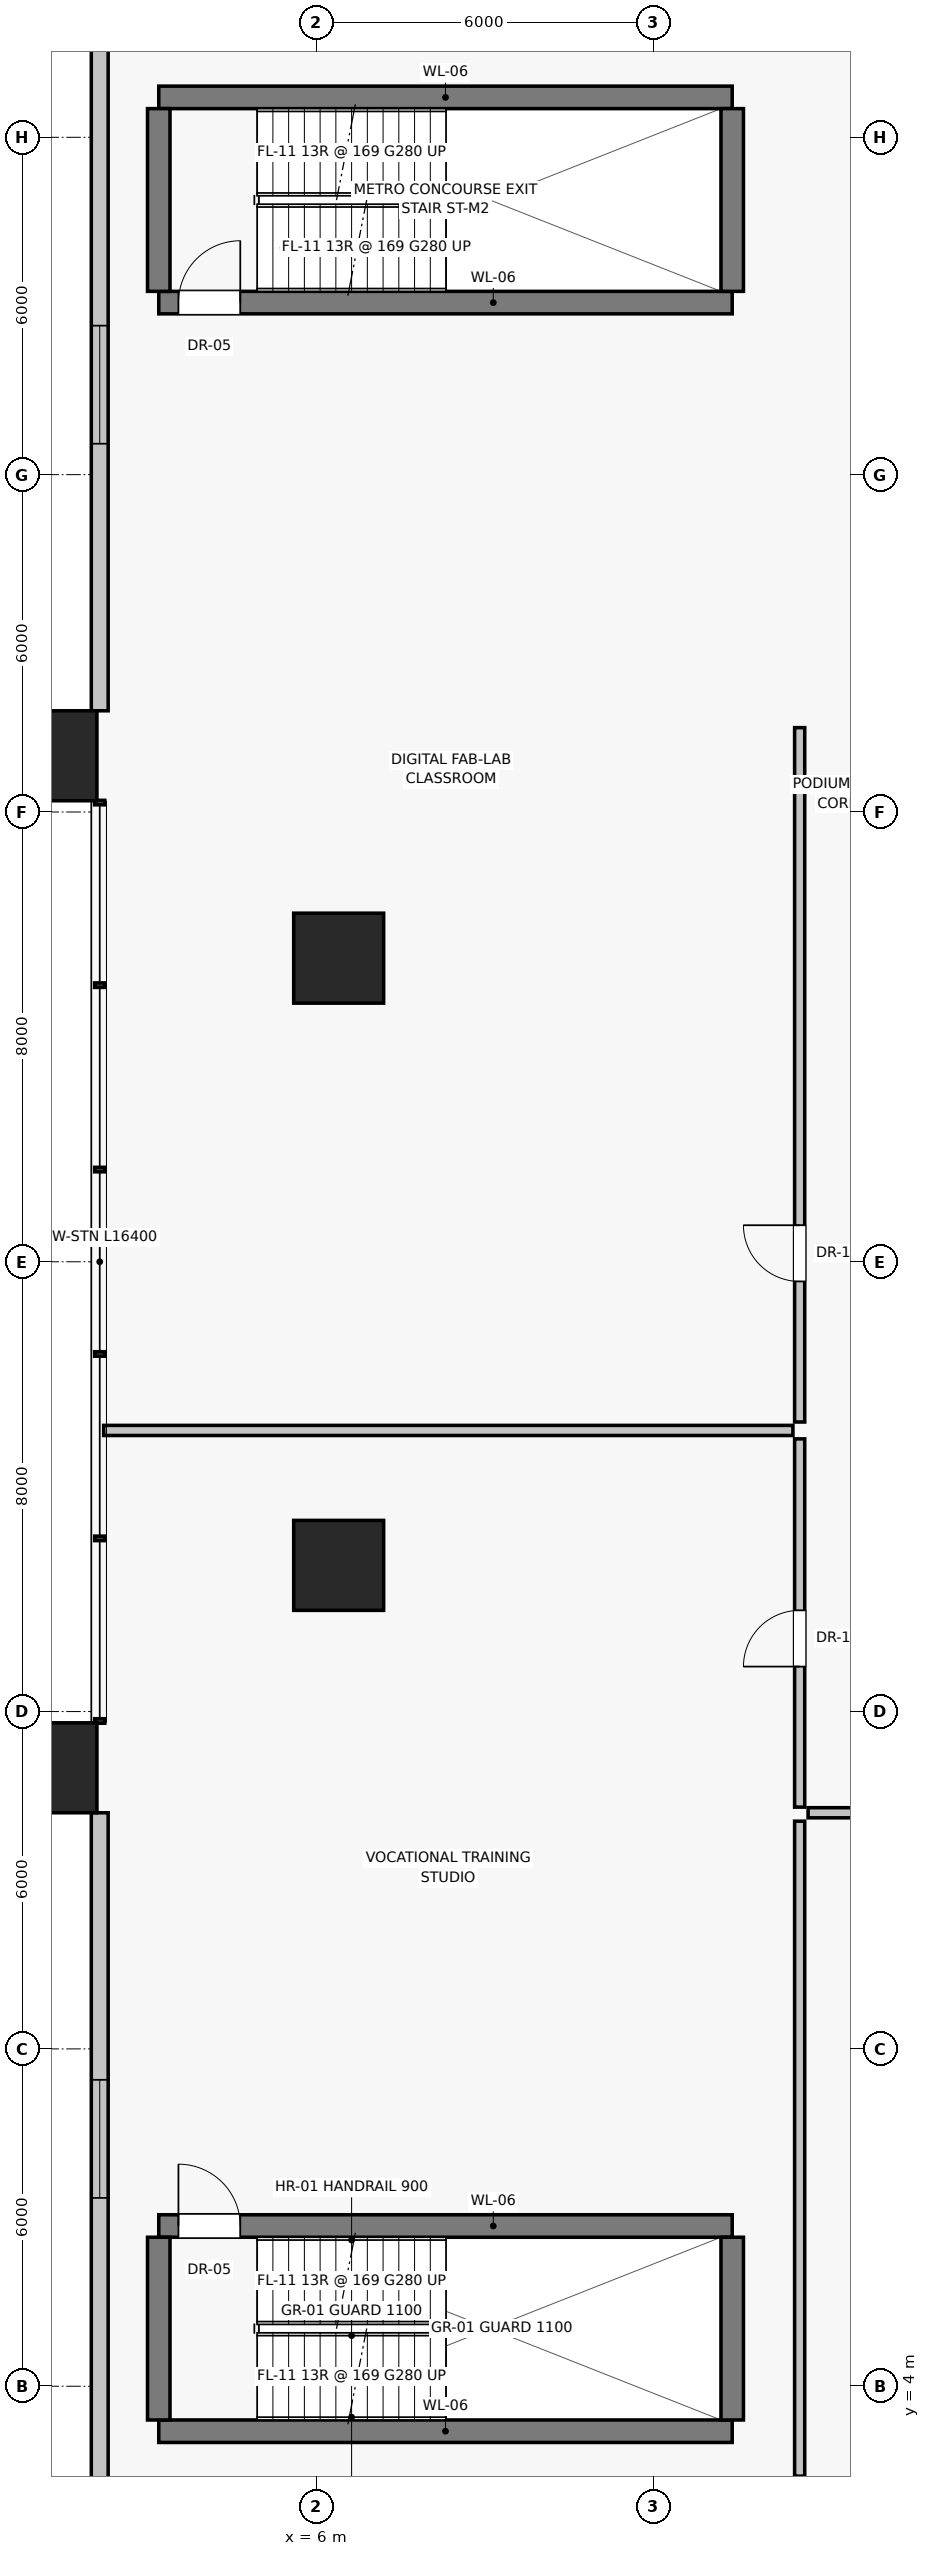
"""IFC4 building model, lengths in metres.
Left out: names, types, materials, properties, quantities, classifications, styles, units other than length and angle.
Written with IfcOpenShell. Run it as: python <this file> out.ifc"""

import sys

from ifc_helpers import new_model, si_unit, direction, frame, frame_2d, origin, origin_2d, place, context, subcontext, project, spatial, rectangle, extrude, source, transform, mapped, element, fill, save


model = new_model("IFC4")
c1 = context("Model", 3, precision=1e-05, world=origin(), true_north=direction((0.0, 1.0)))
c2 = subcontext(c1, "Body", "Model", "MODEL_VIEW")
j1 = project(units=[si_unit("LENGTHUNIT", "METRE"), si_unit("PLANEANGLEUNIT", "RADIAN")], contexts=[c1])
p1 = place(None, origin())
s1 = spatial("IfcSite", under=j1, at=p1, CompositionType="ELEMENT")
p2 = place(p1, origin())
s2 = spatial("IfcBuilding", under=s1, at=p2, CompositionType="ELEMENT")
p3 = place(p2, frame((0.0, 0.0, 9.6)))
s3 = spatial("IfcBuildingStorey", under=s2, at=p3, CompositionType="ELEMENT", Elevation=9.6)
for number, where, z_axis, x_axis in (
    (1, (1.3, 15.0, 0.0), (0.0, 0.0, 1.0), (1.0, 0.0, 0.0)),
    (2, (1.3, 33.0, 0.0), (0.0, 0.0, 1.0), (1.0, 0.0, 0.0)),
    (3, (6.4, 29.4, 0.0), (0.0, 0.0, 1.0), (1.0, 0.0, 0.0)),
    (4, (6.4, 18.6, 0.0), (0.0, 0.0, 1.0), (1.0, 0.0, 0.0)),
):
    element("IfcColumn", number, at=place(p3, frame(where, z_axis=z_axis, x_axis=x_axis)), inside=s3, PredefinedType="COLUMN", context=c2, shape_type="SweptSolid", body=[
        extrude(rectangle(XDim=1.6, YDim=1.6, at=origin_2d()), origin(), (0.0, 0.0, 1.0), 4.4),
    ])
p4 = place(p3, frame((2.15, 45.7, 0.0), z_axis=(0.0, 0.0, 1.0), x_axis=(0.0, -1.0, 0.0)))
e5 = element("IfcWall", 5, at=p4, inside=s3, PredefinedType="SOLIDWALL", context=c2, shape_type="SweptSolid", body=[
    extrude(rectangle(XDim=11.9, YDim=0.3, at=frame_2d((5.95, 0.0))), origin(), (0.0, 0.0, 1.0), 3.0),
])
p5 = place(p4, frame((5.05, 0.0, 0.85)))
e6 = element("IfcOpeningElement", 6, at=p5, cuts=e5, PredefinedType="OPENING", context=c2, shape_type="SweptSolid", body=[
    extrude(rectangle(XDim=2.1, YDim=1.75, at=frame_2d((1.05, 0.875))), frame((0.0, 0.16, 0.0), z_axis=(0.0, -1.0, 0.0), x_axis=(1.0, 0.0, 0.0)), (0.0, 0.0, 1.0), 0.32),
])
p6 = place(p3, frame((2.15, 14.2, 0.0), z_axis=(0.0, 0.0, 1.0), x_axis=(0.0, -1.0, 0.0)))
e7 = element("IfcWall", 7, at=p6, inside=s3, PredefinedType="SOLIDWALL", context=c2, shape_type="SweptSolid", body=[
    extrude(rectangle(XDim=11.9, YDim=0.3, at=frame_2d((5.95, 0.0))), origin(), (0.0, 0.0, 1.0), 3.0),
])
p7 = place(p6, frame((4.75, 0.0, 0.85)))
e8 = element("IfcOpeningElement", 8, at=p7, cuts=e7, PredefinedType="OPENING", context=c2, shape_type="SweptSolid", body=[
    extrude(rectangle(XDim=2.1, YDim=1.75, at=frame_2d((1.05, 0.875))), frame((0.0, 0.16, 0.0), z_axis=(0.0, -1.0, 0.0), x_axis=(1.0, 0.0, 0.0)), (0.0, 0.0, 1.0), 0.32),
])
p8 = place(p3, frame((3.2, 3.2, 0.0), z_axis=(0.0, 0.0, 1.0), x_axis=(1.0, 0.0, 0.0)))
e9 = element("IfcWall", 9, at=p8, inside=s3, PredefinedType="SHEAR", context=c2, shape_type="SweptSolid", body=[
    extrude(rectangle(XDim=10.2, YDim=0.4, at=frame_2d((5.1, 0.0))), origin(), (0.0, 0.0, 1.0), 4.1),
])
p9 = place(p3, frame((3.2, 6.85, 0.0), z_axis=(0.0, 0.0, 1.0), x_axis=(1.0, 0.0, 0.0)))
e10 = element("IfcWall", 10, at=p9, inside=s3, PredefinedType="SHEAR", context=c2, shape_type="SweptSolid", body=[
    extrude(rectangle(XDim=10.2, YDim=0.4, at=frame_2d((5.1, 0.0))), origin(), (0.0, 0.0, 1.0), 4.1),
])
p10 = place(p9, frame((0.35, 0.0, 0.0)))
e11 = element("IfcOpeningElement", 11, at=p10, cuts=e10, PredefinedType="OPENING", context=c2, shape_type="SweptSolid", body=[
    extrude(rectangle(XDim=1.1, YDim=2.03, at=frame_2d((0.55, 1.015))), frame((0.0, 0.21, 0.0), z_axis=(0.0, -1.0, 0.0), x_axis=(1.0, 0.0, 0.0)), (0.0, 0.0, 1.0), 0.42),
])
for number, where, z_axis, x_axis in (
    (12, (3.2, 3.4, 0.0), (0.0, 0.0, 1.0), (0.0, 1.0, 0.0)),
    (13, (13.4, 3.4, 0.0), (0.0, 0.0, 1.0), (0.0, 1.0, 0.0)),
):
    element("IfcWall", number, at=place(p3, frame(where, z_axis=z_axis, x_axis=x_axis)), inside=s3, PredefinedType="SHEAR", context=c2, shape_type="SweptSolid", body=[
        extrude(rectangle(XDim=3.25, YDim=0.4, at=frame_2d((1.625, 0.0))), origin(), (0.0, 0.0, 1.0), 4.1),
    ])
p11 = place(p3, frame((3.2, 41.06, 0.0), z_axis=(0.0, 0.0, 1.0), x_axis=(1.0, 0.0, 0.0)))
e14 = element("IfcWall", 14, at=p11, inside=s3, PredefinedType="SHEAR", context=c2, shape_type="SweptSolid", body=[
    extrude(rectangle(XDim=10.2, YDim=0.4, at=frame_2d((5.1, 0.0))), origin(), (0.0, 0.0, 1.0), 4.1),
])
p12 = place(p11, frame((0.35, 0.0, 0.0)))
e15 = element("IfcOpeningElement", 15, at=p12, cuts=e14, PredefinedType="OPENING", context=c2, shape_type="SweptSolid", body=[
    extrude(rectangle(XDim=1.1, YDim=2.03, at=frame_2d((0.55, 1.015))), frame((0.0, 0.21, 0.0), z_axis=(0.0, -1.0, 0.0), x_axis=(1.0, 0.0, 0.0)), (0.0, 0.0, 1.0), 0.42),
])
p13 = place(p3, frame((3.2, 44.71, 0.0), z_axis=(0.0, 0.0, 1.0), x_axis=(1.0, 0.0, 0.0)))
e16 = element("IfcWall", 16, at=p13, inside=s3, PredefinedType="SHEAR", context=c2, shape_type="SweptSolid", body=[
    extrude(rectangle(XDim=10.2, YDim=0.4, at=frame_2d((5.1, 0.0))), origin(), (0.0, 0.0, 1.0), 4.1),
])
for number, where, z_axis, x_axis in (
    (17, (3.2, 41.26, 0.0), (0.0, 0.0, 1.0), (0.0, 1.0, 0.0)),
    (18, (13.4, 41.26, 0.0), (0.0, 0.0, 1.0), (0.0, 1.0, 0.0)),
):
    element("IfcWall", number, at=place(p3, frame(where, z_axis=z_axis, x_axis=x_axis)), inside=s3, PredefinedType="SHEAR", context=c2, shape_type="SweptSolid", body=[
        extrude(rectangle(XDim=3.25, YDim=0.4, at=frame_2d((1.625, 0.0))), origin(), (0.0, 0.0, 1.0), 4.1),
    ])
p14 = place(p3, frame((14.6, 14.3, 0.0), z_axis=(0.0, 0.0, 1.0), x_axis=(0.0, 1.0, 0.0)))
e19 = element("IfcWall", 19, at=p14, inside=s3, PredefinedType="PARTITIONING", context=c2, shape_type="SweptSolid", body=[
    extrude(rectangle(XDim=6.55, YDim=0.18, at=frame_2d((3.275, 0.0))), origin(), (0.0, 0.0, 1.0), 4.1),
])
p15 = place(p14, frame((2.5, 0.0, 0.0)))
e20 = element("IfcOpeningElement", 20, at=p15, cuts=e19, PredefinedType="OPENING", context=c2, shape_type="SweptSolid", body=[
    extrude(rectangle(XDim=1.0, YDim=2.01, at=frame_2d((0.5, 1.005))), frame((0.0, 0.1, 0.0), z_axis=(0.0, -1.0, 0.0), x_axis=(1.0, 0.0, 0.0)), (0.0, 0.0, 1.0), 0.2),
])
p16 = place(p3, frame((14.6, 21.15, 0.0), z_axis=(0.0, 0.0, 1.0), x_axis=(0.0, 1.0, 0.0)))
e21 = element("IfcWall", 21, at=p16, inside=s3, PredefinedType="PARTITIONING", context=c2, shape_type="SweptSolid", body=[
    extrude(rectangle(XDim=12.35, YDim=0.18, at=frame_2d((6.175, 0.0))), origin(), (0.0, 0.0, 1.0), 4.1),
])
p17 = place(p16, frame((2.5, 0.0, 0.0)))
e22 = element("IfcOpeningElement", 22, at=p17, cuts=e21, PredefinedType="OPENING", context=c2, shape_type="SweptSolid", body=[
    extrude(rectangle(XDim=1.0, YDim=2.01, at=frame_2d((0.5, 1.005))), frame((0.0, 0.1, 0.0), z_axis=(0.0, -1.0, 0.0), x_axis=(1.0, 0.0, 0.0)), (0.0, 0.0, 1.0), 0.2),
])
p18 = place(p3, frame((2.22, 21.0, 0.0), z_axis=(0.0, 0.0, 1.0), x_axis=(1.0, 0.0, 0.0)))
e23 = element("IfcWall", 23, at=p18, inside=s3, PredefinedType="PARTITIONING", context=c2, shape_type="SweptSolid", body=[
    extrude(rectangle(XDim=12.26, YDim=0.18, at=frame_2d((6.13, 0.0))), origin(), (0.0, 0.0, 1.0), 4.1),
])
p19 = place(p3, frame((14.6, 2.4, 0.0), z_axis=(0.0, 0.0, 1.0), x_axis=(0.0, 1.0, 0.0)))
e24 = element("IfcWall", 24, at=p19, inside=s3, PredefinedType="PARTITIONING", context=c2, shape_type="SweptSolid", body=[
    extrude(rectangle(XDim=11.65, YDim=0.18, at=frame_2d((5.825, 0.0))), origin(), (0.0, 0.0, 1.0), 4.1),
])
p20 = place(p3, frame((14.75, 14.2, 0.0), z_axis=(0.0, 0.0, 1.0), x_axis=(1.0, 0.0, 0.0)))
e25 = element("IfcWall", 25, at=p20, inside=s3, PredefinedType="PARTITIONING", context=c2, shape_type="SweptSolid", body=[
    extrude(rectangle(XDim=13.1, YDim=0.18, at=frame_2d((6.55, 0.0))), origin(), (0.0, 0.0, 1.0), 4.1),
])
p21 = place(p20, frame((2.5, 0.0, 0.0)))
e26 = element("IfcOpeningElement", 26, at=p21, cuts=e25, PredefinedType="OPENING", context=c2, shape_type="SweptSolid", body=[
    extrude(rectangle(XDim=1.0, YDim=2.01, at=frame_2d((0.5, 1.005))), frame((0.0, 0.1, 0.0), z_axis=(0.0, -1.0, 0.0), x_axis=(1.0, 0.0, 0.0)), (0.0, 0.0, 1.0), 0.2),
])
m1 = source(origin(), c2, "Body", "SweptSolid", [
    extrude(rectangle(XDim=2.1, YDim=1.75, at=frame_2d((1.05, 0.875))), frame((0.0, 0.03, 0.0), z_axis=(0.0, -1.0, 0.0), x_axis=(1.0, 0.0, 0.0)), (0.0, 0.0, 1.0), 0.06),
])
p22 = place(p5, origin())
e27 = element("IfcWindow", 27, at=p22, inside=s3, PartitioningType="DOUBLE_PANEL_VERTICAL", PredefinedType="WINDOW", context=c2, shape_type="MappedRepresentation", body=[
    mapped(m1, transform((0.0, 0.0, 0.0), scale=1.0)),
])
fill(e6, e27)
p23 = place(p7, origin())
e28 = element("IfcWindow", 28, at=p23, inside=s3, PartitioningType="DOUBLE_PANEL_VERTICAL", PredefinedType="WINDOW", context=c2, shape_type="MappedRepresentation", body=[
    mapped(m1, transform((0.0, 0.0, 0.0), scale=1.0)),
])
fill(e8, e28)
m2 = source(origin(), c2, "Body", "SweptSolid", [
    extrude(rectangle(XDim=1.1, YDim=2.03, at=frame_2d((0.55, 1.015))), frame((0.0, 0.025, 0.0), z_axis=(0.0, -1.0, 0.0), x_axis=(1.0, 0.0, 0.0)), (0.0, 0.0, 1.0), 0.05),
])
p24 = place(p10, origin())
e29 = element("IfcDoor", 29, at=p24, inside=s3, OperationType="SINGLE_SWING_LEFT", PredefinedType="DOOR", context=c2, shape_type="MappedRepresentation", body=[
    mapped(m2, transform((0.0, 0.0, 0.0), scale=1.0)),
])
fill(e11, e29)
p25 = place(p12, origin())
e30 = element("IfcDoor", 30, at=p25, inside=s3, OperationType="SINGLE_SWING_RIGHT", PredefinedType="DOOR", context=c2, shape_type="MappedRepresentation", body=[
    mapped(m2, transform((0.0, 0.0, 0.0), scale=1.0)),
])
fill(e15, e30)
m3 = source(origin(), c2, "Body", "SweptSolid", [
    extrude(rectangle(XDim=1.0, YDim=2.01, at=frame_2d((0.5, 1.005))), frame((0.0, 0.025, 0.0), z_axis=(0.0, -1.0, 0.0), x_axis=(1.0, 0.0, 0.0)), (0.0, 0.0, 1.0), 0.05),
])
p26 = place(p15, origin())
e31 = element("IfcDoor", 31, at=p26, inside=s3, OperationType="SINGLE_SWING_LEFT", PredefinedType="DOOR", context=c2, shape_type="MappedRepresentation", body=[
    mapped(m3, transform((0.0, 0.0, 0.0), scale=1.0)),
])
fill(e20, e31)
p27 = place(p17, origin())
e32 = element("IfcDoor", 32, at=p27, inside=s3, OperationType="SINGLE_SWING_RIGHT", PredefinedType="DOOR", context=c2, shape_type="MappedRepresentation", body=[
    mapped(m3, transform((0.0, 0.0, 0.0), scale=1.0)),
])
fill(e22, e32)
save(model, sys.argv[1])
